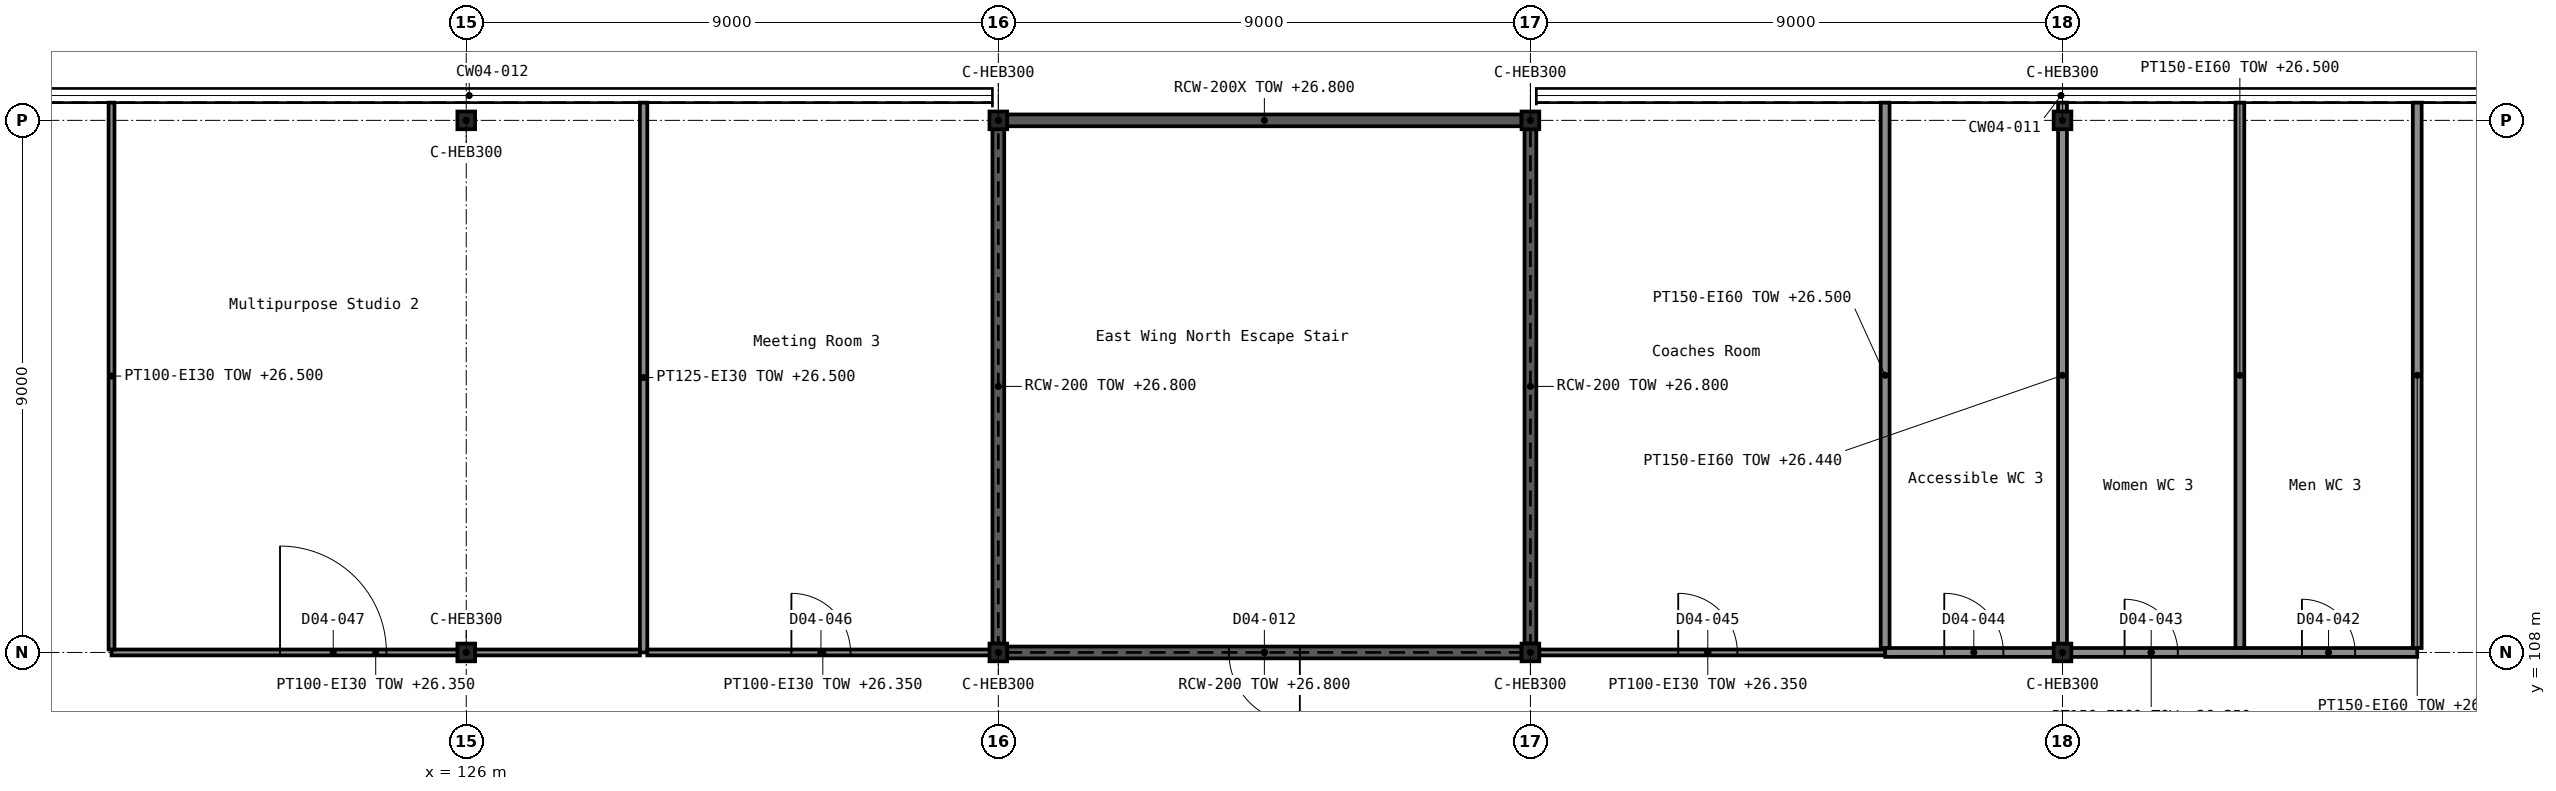
"""IFC4 building model, lengths in metres.
Left out: names, types, materials, properties, quantities, classifications, styles, units other than length and angle.
Written with IfcOpenShell. Run it as: python <this file> out.ifc"""

import sys

from ifc_helpers import new_model, si_unit, direction, frame, frame_2d, origin, origin_2d, place, context, subcontext, project, spatial, rectangle, i_section, extrude, element, fill, save


model = new_model("IFC4")
c1 = context("Model", 3, precision=1e-05, world=origin(), true_north=direction((0.0, 1.0)))
c2 = subcontext(c1, "Body", "Model", "MODEL_VIEW")
j1 = project(units=[si_unit("LENGTHUNIT", "METRE"), si_unit("PLANEANGLEUNIT", "RADIAN")], contexts=[c1])
p1 = place(None, origin())
s1 = spatial("IfcSite", under=j1, at=p1, CompositionType="ELEMENT")
p2 = place(p1, origin())
s2 = spatial("IfcBuilding", under=s1, at=p2, CompositionType="ELEMENT")
p3 = place(p2, frame((0.0, 0.0, 21.6)))
s3 = spatial("IfcBuildingStorey", under=s2, at=p3, CompositionType="ELEMENT", Elevation=21.6)
for number, where, z_axis, x_axis in (
    (1, (126.0, 108.0, 0.0), (0.0, 0.0, 1.0), (1.0, 0.0, 0.0)),
    (2, (135.0, 108.0, 0.0), (0.0, 0.0, 1.0), (1.0, 0.0, 0.0)),
    (3, (144.0, 108.0, 0.0), (0.0, 0.0, 1.0), (1.0, 0.0, 0.0)),
    (4, (153.0, 108.0, 0.0), (0.0, 0.0, 1.0), (1.0, 0.0, 0.0)),
    (5, (126.0, 117.0, 0.0), (0.0, 0.0, 1.0), (1.0, 0.0, 0.0)),
    (6, (135.0, 117.0, 0.0), (0.0, 0.0, 1.0), (1.0, 0.0, 0.0)),
    (7, (144.0, 117.0, 0.0), (0.0, 0.0, 1.0), (1.0, 0.0, 0.0)),
    (8, (153.0, 117.0, 0.0), (0.0, 0.0, 1.0), (1.0, 0.0, 0.0)),
):
    element("IfcColumn", number, at=place(p3, frame(where, z_axis=z_axis, x_axis=x_axis)), inside=s3, PredefinedType="COLUMN", context=c2, shape_type="SweptSolid", body=[
        extrude(i_section(OverallWidth=0.3, OverallDepth=0.3, WebThickness=0.011, FlangeThickness=0.019, FilletRadius=0.027, at=origin_2d()), origin(), (0.0, 0.0, 1.0), 5.4),
    ])
p4 = place(p3, frame((135.15, 108.0, 0.0), z_axis=(0.0, 0.0, 1.0), x_axis=(1.0, 0.0, 0.0)))
e9 = element("IfcWall", 9, at=p4, inside=s3, PredefinedType="SHEAR", context=c2, shape_type="SweptSolid", body=[
    extrude(rectangle(XDim=8.7, YDim=0.2, at=frame_2d((4.35, 0.0))), origin(), (0.0, 0.0, 1.0), 5.2),
])
p5 = place(p4, frame((3.75, 0.0, 0.0)))
e10 = element("IfcOpeningElement", 10, at=p5, cuts=e9, PredefinedType="OPENING", context=c2, shape_type="SweptSolid", body=[
    extrude(rectangle(XDim=1.2, YDim=2.1, at=frame_2d((0.6, 1.05))), frame((0.0, 0.111, 0.0), z_axis=(0.0, -1.0, 0.0), x_axis=(1.0, 0.0, 0.0)), (0.0, 0.0, 1.0), 0.222),
])
for number, where, z_axis, x_axis in (
    (11, (135.15, 117.0, 0.0), (0.0, 0.0, 1.0), (1.0, 0.0, 0.0)),
    (12, (135.0, 108.15, 0.0), (0.0, 0.0, 1.0), (0.0, 1.0, 0.0)),
    (13, (144.0, 108.15, 0.0), (0.0, 0.0, 1.0), (0.0, 1.0, 0.0)),
):
    element("IfcWall", number, at=place(p3, frame(where, z_axis=z_axis, x_axis=x_axis)), inside=s3, PredefinedType="SHEAR", context=c2, shape_type="SweptSolid", body=[
        extrude(rectangle(XDim=8.7, YDim=0.2, at=frame_2d((4.35, 0.0))), origin(), (0.0, 0.0, 1.0), 5.2),
    ])
p6 = place(p3, frame((150.0, 108.0, 0.0), z_axis=(0.0, 0.0, 1.0), x_axis=(1.0, 0.0, 0.0)))
e14 = element("IfcWall", 14, at=p6, inside=s3, PredefinedType="PARTITIONING", context=c2, shape_type="SweptSolid", body=[
    extrude(rectangle(XDim=9.0, YDim=0.15, at=frame_2d((4.5, 0.0))), origin(), (0.0, 0.0, 1.0), 4.75),
])
p7 = place(p6, frame((7.05, 0.0, 0.0)))
e15 = element("IfcOpeningElement", 15, at=p7, cuts=e14, PredefinedType="OPENING", context=c2, shape_type="SweptSolid", body=[
    extrude(rectangle(XDim=0.9, YDim=2.1, at=frame_2d((0.45, 1.05))), frame((0.0, 0.086, 0.0), z_axis=(0.0, -1.0, 0.0), x_axis=(1.0, 0.0, 0.0)), (0.0, 0.0, 1.0), 0.172),
])
p8 = place(p6, frame((4.05, 0.0, 0.0)))
e16 = element("IfcOpeningElement", 16, at=p8, cuts=e14, PredefinedType="OPENING", context=c2, shape_type="SweptSolid", body=[
    extrude(rectangle(XDim=0.9, YDim=2.1, at=frame_2d((0.45, 1.05))), frame((0.0, 0.086, 0.0), z_axis=(0.0, -1.0, 0.0), x_axis=(1.0, 0.0, 0.0)), (0.0, 0.0, 1.0), 0.172),
])
p9 = place(p6, frame((1.0, 0.0, 0.0)))
e17 = element("IfcOpeningElement", 17, at=p9, cuts=e14, PredefinedType="OPENING", context=c2, shape_type="SweptSolid", body=[
    extrude(rectangle(XDim=1.0, YDim=2.1, at=frame_2d((0.5, 1.05))), frame((0.0, 0.086, 0.0), z_axis=(0.0, -1.0, 0.0), x_axis=(1.0, 0.0, 0.0)), (0.0, 0.0, 1.0), 0.172),
])
p10 = place(p3, frame((150.0, 108.075, 0.0), z_axis=(0.0, 0.0, 1.0), x_axis=(0.0, 1.0, 0.0)))
e18 = element("IfcWall", 18, at=p10, inside=s3, PredefinedType="PARTITIONING", context=c2, shape_type="SweptSolid", body=[
    extrude(rectangle(XDim=9.225, YDim=0.15, at=frame_2d((4.613, 0.0))), origin(), (0.0, 0.0, 1.0), 4.9),
])
p11 = place(p3, frame((153.0, 108.075, 0.0), z_axis=(0.0, 0.0, 1.0), x_axis=(0.0, 1.0, 0.0)))
e19 = element("IfcWall", 19, at=p11, inside=s3, PredefinedType="PARTITIONING", context=c2, shape_type="SweptSolid", body=[
    extrude(rectangle(XDim=9.225, YDim=0.15, at=frame_2d((4.613, 0.0))), origin(), (0.0, 0.0, 1.0), 4.84),
])
for number, where, z_axis, x_axis in (
    (20, (156.0, 108.075, 0.0), (0.0, 0.0, 1.0), (0.0, 1.0, 0.0)),
    (21, (159.0, 108.075, 0.0), (0.0, 0.0, 1.0), (0.0, 1.0, 0.0)),
):
    element("IfcWall", number, at=place(p3, frame(where, z_axis=z_axis, x_axis=x_axis)), inside=s3, PredefinedType="PARTITIONING", context=c2, shape_type="SweptSolid", body=[
        extrude(rectangle(XDim=9.225, YDim=0.15, at=frame_2d((4.613, 0.0))), origin(), (0.0, 0.0, 1.0), 4.9),
    ])
p12 = place(p3, frame((129.0, 108.0, 0.0), z_axis=(0.0, 0.0, 1.0), x_axis=(0.0, 1.0, 0.0)))
e22 = element("IfcWall", 22, at=p12, inside=s3, PredefinedType="PARTITIONING", context=c2, shape_type="SweptSolid", body=[
    extrude(rectangle(XDim=9.3, YDim=0.125, at=frame_2d((4.65, 0.0))), origin(), (0.0, 0.0, 1.0), 4.9),
])
p13 = place(p3, frame((120.0, 108.0, 0.0), z_axis=(0.0, 0.0, 1.0), x_axis=(1.0, 0.0, 0.0)))
e23 = element("IfcWall", 23, at=p13, inside=s3, PredefinedType="PARTITIONING", context=c2, shape_type="SweptSolid", body=[
    extrude(rectangle(XDim=8.938, YDim=0.1, at=frame_2d((4.469, 0.0))), origin(), (0.0, 0.0, 1.0), 4.75),
])
p14 = place(p13, frame((2.85, 0.0, 0.0)))
e24 = element("IfcOpeningElement", 24, at=p14, cuts=e23, PredefinedType="OPENING", context=c2, shape_type="SweptSolid", body=[
    extrude(rectangle(XDim=1.8, YDim=2.1, at=frame_2d((0.9, 1.05))), frame((0.0, 0.061, 0.0), z_axis=(0.0, -1.0, 0.0), x_axis=(1.0, 0.0, 0.0)), (0.0, 0.0, 1.0), 0.122),
])
p15 = place(p3, frame((129.062, 108.0, 0.0), z_axis=(0.0, 0.0, 1.0), x_axis=(1.0, 0.0, 0.0)))
e25 = element("IfcWall", 25, at=p15, inside=s3, PredefinedType="PARTITIONING", context=c2, shape_type="SweptSolid", body=[
    extrude(rectangle(XDim=5.938, YDim=0.1, at=frame_2d((2.969, 0.0))), origin(), (0.0, 0.0, 1.0), 4.75),
])
p16 = place(p15, frame((2.438, 0.0, 0.0)))
e26 = element("IfcOpeningElement", 26, at=p16, cuts=e25, PredefinedType="OPENING", context=c2, shape_type="SweptSolid", body=[
    extrude(rectangle(XDim=1.0, YDim=2.1, at=frame_2d((0.5, 1.05))), frame((0.0, 0.061, 0.0), z_axis=(0.0, -1.0, 0.0), x_axis=(1.0, 0.0, 0.0)), (0.0, 0.0, 1.0), 0.122),
])
p17 = place(p3, frame((144.0, 108.0, 0.0), z_axis=(0.0, 0.0, 1.0), x_axis=(1.0, 0.0, 0.0)))
e27 = element("IfcWall", 27, at=p17, inside=s3, PredefinedType="PARTITIONING", context=c2, shape_type="SweptSolid", body=[
    extrude(rectangle(XDim=6.0, YDim=0.1, at=frame_2d((3.0, 0.0))), origin(), (0.0, 0.0, 1.0), 4.75),
])
p18 = place(p17, frame((2.5, 0.0, 0.0)))
e28 = element("IfcOpeningElement", 28, at=p18, cuts=e27, PredefinedType="OPENING", context=c2, shape_type="SweptSolid", body=[
    extrude(rectangle(XDim=1.0, YDim=2.1, at=frame_2d((0.5, 1.05))), frame((0.0, 0.061, 0.0), z_axis=(0.0, -1.0, 0.0), x_axis=(1.0, 0.0, 0.0)), (0.0, 0.0, 1.0), 0.122),
])
p19 = place(p3, frame((120.0, 108.05, 0.0), z_axis=(0.0, 0.0, 1.0), x_axis=(0.0, 1.0, 0.0)))
e29 = element("IfcWall", 29, at=p19, inside=s3, PredefinedType="PARTITIONING", context=c2, shape_type="SweptSolid", body=[
    extrude(rectangle(XDim=9.25, YDim=0.1, at=frame_2d((4.625, 0.0))), origin(), (0.0, 0.0, 1.0), 4.9),
])
p20 = place(p5, frame((1.2, 0.0, 0.0), z_axis=(0.0, 0.0, 1.0), x_axis=(-1.0, 0.0, 0.0)))
e30 = element("IfcDoor", 30, at=p20, inside=s3, OperationType="SINGLE_SWING_LEFT", PredefinedType="DOOR", context=c2, shape_type="SweptSolid", body=[
    extrude(rectangle(XDim=1.2, YDim=2.1, at=frame_2d((0.6, 1.05))), frame((0.0, 0.025, 0.0), z_axis=(0.0, -1.0, 0.0), x_axis=(1.0, 0.0, 0.0)), (0.0, 0.0, 1.0), 0.05),
])
fill(e10, e30)
p21 = place(p7, origin())
e31 = element("IfcDoor", 31, at=p21, inside=s3, OperationType="SINGLE_SWING_LEFT", PredefinedType="DOOR", context=c2, shape_type="SweptSolid", body=[
    extrude(rectangle(XDim=0.9, YDim=2.1, at=frame_2d((0.45, 1.05))), frame((0.0, 0.025, 0.0), z_axis=(0.0, -1.0, 0.0), x_axis=(1.0, 0.0, 0.0)), (0.0, 0.0, 1.0), 0.05),
])
fill(e15, e31)
p22 = place(p8, origin())
e32 = element("IfcDoor", 32, at=p22, inside=s3, OperationType="SINGLE_SWING_LEFT", PredefinedType="DOOR", context=c2, shape_type="SweptSolid", body=[
    extrude(rectangle(XDim=0.9, YDim=2.1, at=frame_2d((0.45, 1.05))), frame((0.0, 0.025, 0.0), z_axis=(0.0, -1.0, 0.0), x_axis=(1.0, 0.0, 0.0)), (0.0, 0.0, 1.0), 0.05),
])
fill(e16, e32)
p23 = place(p9, origin())
e33 = element("IfcDoor", 33, at=p23, inside=s3, OperationType="SINGLE_SWING_LEFT", PredefinedType="DOOR", context=c2, shape_type="SweptSolid", body=[
    extrude(rectangle(XDim=1.0, YDim=2.1, at=frame_2d((0.5, 1.05))), frame((0.0, 0.025, 0.0), z_axis=(0.0, -1.0, 0.0), x_axis=(1.0, 0.0, 0.0)), (0.0, 0.0, 1.0), 0.05),
])
fill(e17, e33)
p24 = place(p18, origin())
e34 = element("IfcDoor", 34, at=p24, inside=s3, OperationType="SINGLE_SWING_LEFT", PredefinedType="DOOR", context=c2, shape_type="SweptSolid", body=[
    extrude(rectangle(XDim=1.0, YDim=2.1, at=frame_2d((0.5, 1.05))), frame((0.0, 0.025, 0.0), z_axis=(0.0, -1.0, 0.0), x_axis=(1.0, 0.0, 0.0)), (0.0, 0.0, 1.0), 0.05),
])
fill(e28, e34)
p25 = place(p16, origin())
e35 = element("IfcDoor", 35, at=p25, inside=s3, OperationType="SINGLE_SWING_LEFT", PredefinedType="DOOR", context=c2, shape_type="SweptSolid", body=[
    extrude(rectangle(XDim=1.0, YDim=2.1, at=frame_2d((0.5, 1.05))), frame((0.0, 0.025, 0.0), z_axis=(0.0, -1.0, 0.0), x_axis=(1.0, 0.0, 0.0)), (0.0, 0.0, 1.0), 0.05),
])
fill(e26, e35)
p26 = place(p14, origin())
e36 = element("IfcDoor", 36, at=p26, inside=s3, OperationType="DOUBLE_DOOR_SINGLE_SWING", PredefinedType="DOOR", context=c2, shape_type="SweptSolid", body=[
    extrude(rectangle(XDim=1.8, YDim=2.1, at=frame_2d((0.9, 1.05))), frame((0.0, 0.025, 0.0), z_axis=(0.0, -1.0, 0.0), x_axis=(1.0, 0.0, 0.0)), (0.0, 0.0, 1.0), 0.05),
])
fill(e24, e36)
save(model, sys.argv[1])
